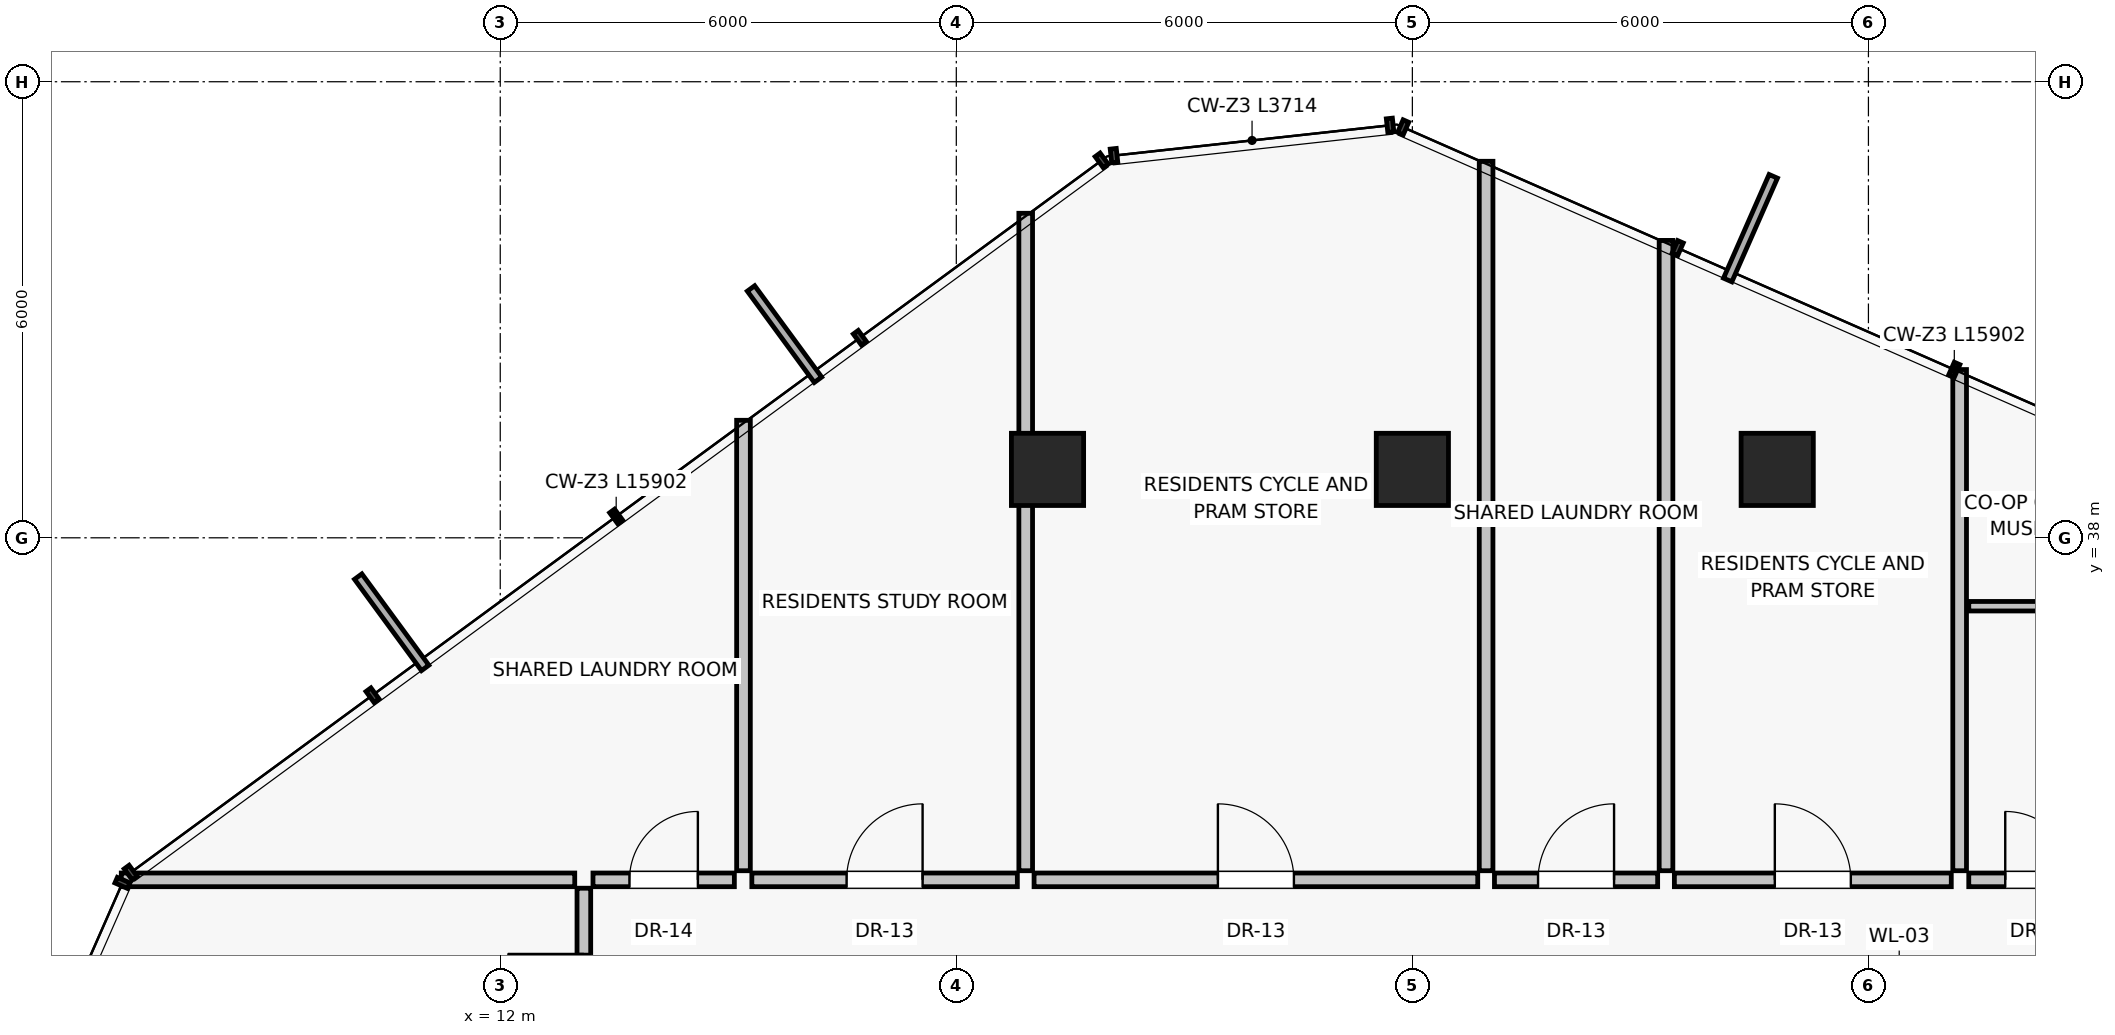
"""IFC4 building model, lengths in metres.
Left out: names, types, materials, properties, quantities, classifications, styles, units other than length and angle.
Written with IfcOpenShell. Run it as: python <this file> out.ifc"""

import sys

from ifc_helpers import new_model, si_unit, direction, frame, frame_2d, origin, origin_2d, place, context, subcontext, project, spatial, rectangle, extrude, source, transform, mapped, element, fill, save


model = new_model("IFC4")
c1 = context("Model", 3, precision=1e-05, world=origin(), true_north=direction((0.0, 1.0)))
c2 = subcontext(c1, "Body", "Model", "MODEL_VIEW")
j1 = project(units=[si_unit("LENGTHUNIT", "METRE"), si_unit("PLANEANGLEUNIT", "RADIAN")], contexts=[c1])
p1 = place(None, origin())
s1 = spatial("IfcSite", under=j1, at=p1, CompositionType="ELEMENT")
p2 = place(p1, origin())
s2 = spatial("IfcBuilding", under=s1, at=p2, CompositionType="ELEMENT")
p3 = place(p2, frame((0.0, 0.0, 185.35)))
s3 = spatial("IfcBuildingStorey", under=s2, at=p3, CompositionType="ELEMENT", Elevation=185.35)
for number, where, z_axis, x_axis in (
    (1, (28.8, 38.9, 0.0), (0.0, 0.0, 1.0), (1.0, 0.0, 0.0)),
    (2, (24.0, 38.9, 0.0), (0.0, 0.0, 1.0), (1.0, 0.0, 0.0)),
    (3, (19.2, 38.9, 0.0), (0.0, 0.0, 1.0), (1.0, 0.0, 0.0)),
):
    element("IfcColumn", number, at=place(p3, frame(where, z_axis=z_axis, x_axis=x_axis)), inside=s3, PredefinedType="COLUMN", context=c2, shape_type="SweptSolid", body=[
        extrude(rectangle(XDim=0.95, YDim=0.95, at=origin_2d()), origin(), (0.0, 0.0, 1.0), 3.25),
    ])
p4 = place(p3, frame((15.2, 33.62, 0.0), z_axis=(0.0, 0.0, 1.0), x_axis=(0.0, 1.0, 0.0)))
e4 = element("IfcWall", 4, at=p4, inside=s3, PredefinedType="PARTITIONING", context=c2, shape_type="SweptSolid", body=[
    extrude(rectangle(XDim=5.926, YDim=0.18, at=frame_2d((2.963, 0.0))), origin(), (0.0, 0.0, 1.0), 3.015),
])
p5 = place(p3, frame((31.2, 33.62, 0.0), z_axis=(0.0, 0.0, 1.0), x_axis=(0.0, 1.0, 0.0)))
e5 = element("IfcWall", 5, at=p5, inside=s3, PredefinedType="PARTITIONING", context=c2, shape_type="SweptSolid", body=[
    extrude(rectangle(XDim=6.593, YDim=0.18, at=frame_2d((3.297, 0.0))), origin(), (0.0, 0.0, 1.0), 3.015),
])
p6 = place(p3, frame((15.31, 33.5, 0.0), z_axis=(0.0, 0.0, 1.0), x_axis=(1.0, 0.0, 0.0)))
e6 = element("IfcWall", 6, at=p6, inside=s3, PredefinedType="PARTITIONING", context=c2, shape_type="SweptSolid", body=[
    extrude(rectangle(XDim=3.493, YDim=0.18, at=frame_2d((1.747, 0.0))), origin(), (0.0, 0.0, 1.0), 3.015),
])
p7 = place(p6, frame((1.247, 0.0, 0.0)))
e7 = element("IfcOpeningElement", 7, at=p7, cuts=e6, PredefinedType="OPENING", context=c2, shape_type="SweptSolid", body=[
    extrude(rectangle(XDim=1.0, YDim=2.01, at=frame_2d((0.5, 1.005))), frame((0.0, 0.1, 0.0), z_axis=(0.0, -1.0, 0.0), x_axis=(1.0, 0.0, 0.0)), (0.0, 0.0, 1.0), 0.2),
])
p8 = place(p3, frame((19.023, 33.5, 0.0), z_axis=(0.0, 0.0, 1.0), x_axis=(1.0, 0.0, 0.0)))
e8 = element("IfcWall", 8, at=p8, inside=s3, PredefinedType="PARTITIONING", context=c2, shape_type="SweptSolid", body=[
    extrude(rectangle(XDim=5.837, YDim=0.18, at=frame_2d((2.918, 0.0))), origin(), (0.0, 0.0, 1.0), 3.015),
])
p9 = place(p8, frame((2.418, 0.0, 0.0)))
e9 = element("IfcOpeningElement", 9, at=p9, cuts=e8, PredefinedType="OPENING", context=c2, shape_type="SweptSolid", body=[
    extrude(rectangle(XDim=1.0, YDim=2.01, at=frame_2d((0.5, 1.005))), frame((0.0, 0.1, 0.0), z_axis=(0.0, -1.0, 0.0), x_axis=(1.0, 0.0, 0.0)), (0.0, 0.0, 1.0), 0.2),
])
p10 = place(p3, frame((18.913, 33.62, 0.0), z_axis=(0.0, 0.0, 1.0), x_axis=(0.0, 1.0, 0.0)))
e10 = element("IfcWall", 10, at=p10, inside=s3, PredefinedType="PARTITIONING", context=c2, shape_type="SweptSolid", body=[
    extrude(rectangle(XDim=8.649, YDim=0.18, at=frame_2d((4.325, 0.0))), origin(), (0.0, 0.0, 1.0), 2.469),
])
p11 = place(p3, frame((24.97, 33.62, 0.0), z_axis=(0.0, 0.0, 1.0), x_axis=(0.0, 1.0, 0.0)))
e11 = element("IfcWall", 11, at=p11, inside=s3, PredefinedType="PARTITIONING", context=c2, shape_type="SweptSolid", body=[
    extrude(rectangle(XDim=9.333, YDim=0.18, at=frame_2d((4.667, 0.0))), origin(), (0.0, 0.0, 1.0), 3.015),
])
p12 = place(p3, frame((25.08, 33.5, 0.0), z_axis=(0.0, 0.0, 1.0), x_axis=(1.0, 0.0, 0.0)))
e12 = element("IfcWall", 12, at=p12, inside=s3, PredefinedType="PARTITIONING", context=c2, shape_type="SweptSolid", body=[
    extrude(rectangle(XDim=2.147, YDim=0.18, at=frame_2d((1.073, 0.0))), origin(), (0.0, 0.0, 1.0), 3.015),
])
p13 = place(p12, frame((0.573, 0.0, 0.0)))
e13 = element("IfcOpeningElement", 13, at=p13, cuts=e12, PredefinedType="OPENING", context=c2, shape_type="SweptSolid", body=[
    extrude(rectangle(XDim=1.0, YDim=2.01, at=frame_2d((0.5, 1.005))), frame((0.0, 0.1, 0.0), z_axis=(0.0, -1.0, 0.0), x_axis=(1.0, 0.0, 0.0)), (0.0, 0.0, 1.0), 0.2),
])
p14 = place(p3, frame((27.447, 33.5, 0.0), z_axis=(0.0, 0.0, 1.0), x_axis=(1.0, 0.0, 0.0)))
e14 = element("IfcWall", 14, at=p14, inside=s3, PredefinedType="PARTITIONING", context=c2, shape_type="SweptSolid", body=[
    extrude(rectangle(XDim=3.643, YDim=0.18, at=frame_2d((1.822, 0.0))), origin(), (0.0, 0.0, 1.0), 3.015),
])
p15 = place(p14, frame((1.322, 0.0, 0.0)))
e15 = element("IfcOpeningElement", 15, at=p15, cuts=e14, PredefinedType="OPENING", context=c2, shape_type="SweptSolid", body=[
    extrude(rectangle(XDim=1.0, YDim=2.01, at=frame_2d((0.5, 1.005))), frame((0.0, 0.1, 0.0), z_axis=(0.0, -1.0, 0.0), x_axis=(1.0, 0.0, 0.0)), (0.0, 0.0, 1.0), 0.2),
])
p16 = place(p3, frame((27.337, 33.62, 0.0), z_axis=(0.0, 0.0, 1.0), x_axis=(0.0, 1.0, 0.0)))
e16 = element("IfcWall", 16, at=p16, inside=s3, PredefinedType="PARTITIONING", context=c2, shape_type="SweptSolid", body=[
    extrude(rectangle(XDim=8.292, YDim=0.18, at=frame_2d((4.146, 0.0))), origin(), (0.0, 0.0, 1.0), 3.015),
])
p17 = place(p3, frame((12.98, 33.5, 0.0), z_axis=(0.0, 0.0, 1.0), x_axis=(-1.0, 0.0, 0.0)))
e17 = element("IfcWall", 17, at=p17, inside=s3, PredefinedType="PARTITIONING", context=c2, shape_type="SweptSolid", body=[
    extrude(rectangle(XDim=5.966, YDim=0.18, at=frame_2d((2.983, 0.0))), origin(), (0.0, 0.0, 1.0), 3.015),
])
p18 = place(p3, frame((13.1, 30.66, 0.0), z_axis=(0.0, 0.0, 1.0), x_axis=(0.0, 1.0, 0.0)))
e18 = element("IfcWall", 18, at=p18, inside=s3, PredefinedType="PARTITIONING", context=c2, shape_type="SweptSolid", body=[
    extrude(rectangle(XDim=2.73, YDim=0.18, at=frame_2d((1.365, 0.0))), origin(), (0.0, 0.0, 1.0), 3.015),
])
p19 = place(p18, frame((0.865, 0.0, 0.0)))
e19 = element("IfcOpeningElement", 19, at=p19, cuts=e18, PredefinedType="OPENING", context=c2, shape_type="SweptSolid", body=[
    extrude(rectangle(XDim=1.0, YDim=2.01, at=frame_2d((0.5, 1.005))), frame((0.0, 0.1, 0.0), z_axis=(0.0, -1.0, 0.0), x_axis=(1.0, 0.0, 0.0)), (0.0, 0.0, 1.0), 0.2),
])
p20 = place(p3, frame((13.22, 33.5, 0.0), z_axis=(0.0, 0.0, 1.0), x_axis=(1.0, 0.0, 0.0)))
e20 = element("IfcWall", 20, at=p20, inside=s3, PredefinedType="PARTITIONING", context=c2, shape_type="SweptSolid", body=[
    extrude(rectangle(XDim=1.86, YDim=0.18, at=frame_2d((0.93, 0.0))), origin(), (0.0, 0.0, 1.0), 3.015),
])
p21 = place(p20, frame((0.48, 0.0, 0.0)))
e21 = element("IfcOpeningElement", 21, at=p21, cuts=e20, PredefinedType="OPENING", context=c2, shape_type="SweptSolid", body=[
    extrude(rectangle(XDim=0.9, YDim=2.01, at=frame_2d((0.45, 1.005))), frame((0.0, 0.1, 0.0), z_axis=(0.0, -1.0, 0.0), x_axis=(1.0, 0.0, 0.0)), (0.0, 0.0, 1.0), 0.2),
])
p22 = place(p3, frame((31.32, 33.5, 0.0), z_axis=(0.0, 0.0, 1.0), x_axis=(1.0, 0.0, 0.0)))
e22 = element("IfcWall", 22, at=p22, inside=s3, PredefinedType="PARTITIONING", context=c2, shape_type="SweptSolid", body=[
    extrude(rectangle(XDim=1.86, YDim=0.18, at=frame_2d((0.93, 0.0))), origin(), (0.0, 0.0, 1.0), 3.015),
])
p23 = place(p22, frame((0.48, 0.0, 0.0)))
e23 = element("IfcOpeningElement", 23, at=p23, cuts=e22, PredefinedType="OPENING", context=c2, shape_type="SweptSolid", body=[
    extrude(rectangle(XDim=0.9, YDim=2.01, at=frame_2d((0.45, 1.005))), frame((0.0, 0.1, 0.0), z_axis=(0.0, -1.0, 0.0), x_axis=(1.0, 0.0, 0.0)), (0.0, 0.0, 1.0), 0.2),
])
p24 = place(p3, frame((31.32, 37.1, 0.0), z_axis=(0.0, 0.0, 1.0), x_axis=(1.0, 0.0, 0.0)))
e24 = element("IfcWall", 24, at=p24, inside=s3, PredefinedType="PARTITIONING", context=c2, shape_type="SweptSolid", body=[
    extrude(rectangle(XDim=6.959, YDim=0.125, at=frame_2d((3.479, 0.0))), origin(), (0.0, 0.0, 1.0), 3.015),
])
p25 = place(p24, frame((3.03, 0.0, 0.0)))
e25 = element("IfcOpeningElement", 25, at=p25, cuts=e24, PredefinedType="OPENING", context=c2, shape_type="SweptSolid", body=[
    extrude(rectangle(XDim=0.9, YDim=2.01, at=frame_2d((0.45, 1.005))), frame((0.0, 0.073, 0.0), z_axis=(0.0, -1.0, 0.0), x_axis=(1.0, 0.0, 0.0)), (0.0, 0.0, 1.0), 0.145),
])
m1 = source(origin(), c2, "Body", "SweptSolid", [
    extrude(rectangle(XDim=1.0, YDim=2.01, at=frame_2d((0.5, 1.005))), frame((0.0, 0.025, 0.0), z_axis=(0.0, -1.0, 0.0), x_axis=(1.0, 0.0, 0.0)), (0.0, 0.0, 1.0), 0.05),
])
p26 = place(p7, origin())
e26 = element("IfcDoor", 26, at=p26, inside=s3, OperationType="SINGLE_SWING_RIGHT", PredefinedType="DOOR", context=c2, shape_type="MappedRepresentation", body=[
    mapped(m1, transform((0.0, 0.0, 0.0), scale=1.0)),
])
fill(e7, e26)
p27 = place(p9, origin())
e27 = element("IfcDoor", 27, at=p27, inside=s3, OperationType="SINGLE_SWING_LEFT", PredefinedType="DOOR", context=c2, shape_type="MappedRepresentation", body=[
    mapped(m1, transform((0.0, 0.0, 0.0), scale=1.0)),
])
fill(e9, e27)
p28 = place(p13, origin())
e28 = element("IfcDoor", 28, at=p28, inside=s3, OperationType="SINGLE_SWING_RIGHT", PredefinedType="DOOR", context=c2, shape_type="MappedRepresentation", body=[
    mapped(m1, transform((0.0, 0.0, 0.0), scale=1.0)),
])
fill(e13, e28)
p29 = place(p15, origin())
e29 = element("IfcDoor", 29, at=p29, inside=s3, OperationType="SINGLE_SWING_LEFT", PredefinedType="DOOR", context=c2, shape_type="MappedRepresentation", body=[
    mapped(m1, transform((0.0, 0.0, 0.0), scale=1.0)),
])
fill(e15, e29)
p30 = place(p19, origin())
e30 = element("IfcDoor", 30, at=p30, inside=s3, OperationType="SINGLE_SWING_RIGHT", PredefinedType="DOOR", context=c2, shape_type="MappedRepresentation", body=[
    mapped(m1, transform((0.0, 0.0, 0.0), scale=1.0)),
])
fill(e19, e30)
m2 = source(origin(), c2, "Body", "SweptSolid", [
    extrude(rectangle(XDim=0.9, YDim=2.01, at=frame_2d((0.45, 1.005))), frame((0.0, 0.025, 0.0), z_axis=(0.0, -1.0, 0.0), x_axis=(1.0, 0.0, 0.0)), (0.0, 0.0, 1.0), 0.05),
])
p31 = place(p21, origin())
e31 = element("IfcDoor", 31, at=p31, inside=s3, OperationType="SINGLE_SWING_RIGHT", PredefinedType="DOOR", context=c2, shape_type="MappedRepresentation", body=[
    mapped(m2, transform((0.0, 0.0, 0.0), scale=1.0)),
])
fill(e21, e31)
p32 = place(p23, origin())
e32 = element("IfcDoor", 32, at=p32, inside=s3, OperationType="SINGLE_SWING_LEFT", PredefinedType="DOOR", context=c2, shape_type="MappedRepresentation", body=[
    mapped(m2, transform((0.0, 0.0, 0.0), scale=1.0)),
])
fill(e23, e32)
save(model, sys.argv[1])
